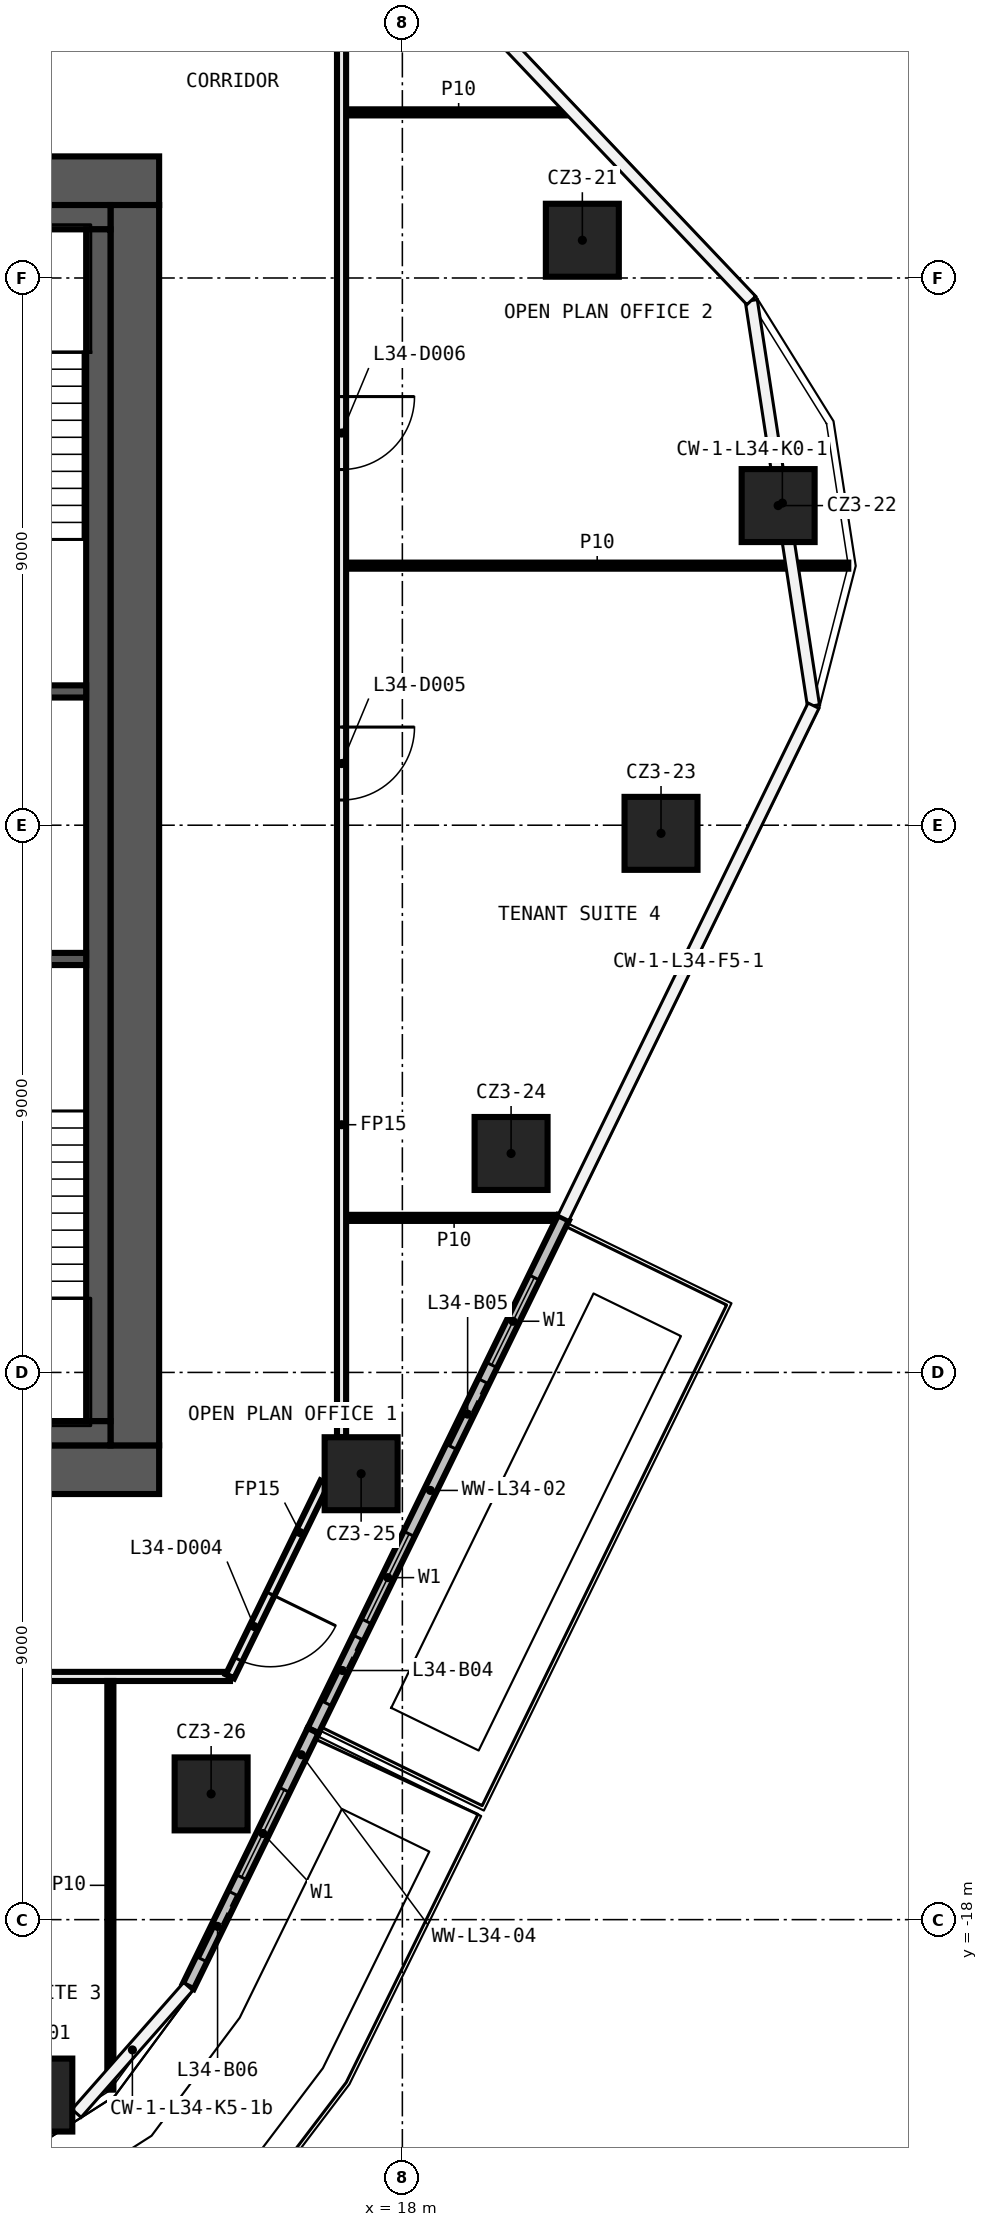
"""IFC4 building model, lengths in metres.
Left out: names, types, materials, properties, quantities, classifications, styles, units other than length and angle.
Written with IfcOpenShell. Run it as: python <this file> out.ifc"""

import sys

from ifc_helpers import new_model, si_unit, direction, frame, frame_2d, origin, origin_2d, place, context, subcontext, project, spatial, rectangle, extrude, element, fill, save


model = new_model("IFC4")
c1 = context("Model", 3, precision=1e-05, world=origin(), true_north=direction((0.0, 1.0)))
c2 = subcontext(c1, "Body", "Model", "MODEL_VIEW")
j1 = project(units=[si_unit("LENGTHUNIT", "METRE"), si_unit("PLANEANGLEUNIT", "RADIAN")], contexts=[c1])
p1 = place(None, origin())
s1 = spatial("IfcSite", under=j1, at=p1, CompositionType="ELEMENT")
p2 = place(p1, origin())
s2 = spatial("IfcBuilding", under=s1, at=p2, CompositionType="ELEMENT")
p3 = place(p2, frame((0.0, 0.0, 158.6)))
s3 = spatial("IfcBuildingStorey", under=s2, at=p3, CompositionType="ELEMENT", Elevation=158.6)
for number, where, z_axis, x_axis in (
    (1, (11.972, -20.885, 0.0), (0.0, 0.0, 1.0), (1.0, 0.0, 0.0)),
    (2, (20.96, 9.621, 0.0), (0.0, 0.0, 1.0), (1.0, 0.0, 0.0)),
    (3, (24.18, 5.257, 0.0), (0.0, 0.0, 1.0), (1.0, 0.0, 0.0)),
    (4, (22.254, -0.134, 0.0), (0.0, 0.0, 1.0), (1.0, 0.0, 0.0)),
    (5, (19.788, -5.399, 0.0), (0.0, 0.0, 1.0), (1.0, 0.0, 0.0)),
    (6, (17.322, -10.666, 0.0), (0.0, 0.0, 1.0), (1.0, 0.0, 0.0)),
    (7, (14.855, -15.932, 0.0), (0.0, 0.0, 1.0), (1.0, 0.0, 0.0)),
):
    element("IfcColumn", number, at=place(p3, frame(where, z_axis=z_axis, x_axis=x_axis)), inside=s3, PredefinedType="COLUMN", context=c2, shape_type="SweptSolid", body=[
        extrude(rectangle(XDim=1.2, YDim=1.2, at=origin_2d()), origin(), (0.0, 0.0, 1.0), 3.82),
    ])
p4 = place(p3, frame((15.165, -14.0, 0.0), z_axis=(0.0, 0.0, 1.0), x_axis=(-1.0, 0.0, 0.0)))
e8 = element("IfcWall", 8, at=p4, inside=s3, PredefinedType="PARTITIONING", context=c2, shape_type="SweptSolid", body=[
    extrude(rectangle(XDim=24.24, YDim=0.15, at=frame_2d((12.12, 0.0))), origin(), (0.0, 0.0, 1.0), 3.82),
])
p5 = place(p4, frame((15.788, 0.0, 0.0)))
e9 = element("IfcOpeningElement", 9, at=p5, cuts=e8, PredefinedType="OPENING", context=c2, shape_type="SweptSolid", body=[
    extrude(rectangle(XDim=1.2, YDim=2.1, at=frame_2d((0.6, 1.05))), frame((0.0, 0.085, 0.0), z_axis=(0.0, -1.0, 0.0), x_axis=(1.0, 0.0, 0.0)), (0.0, 0.0, 1.0), 0.17),
])
p6 = place(p4, frame((7.379, 0.0, 0.0)))
e10 = element("IfcOpeningElement", 10, at=p6, cuts=e8, PredefinedType="OPENING", context=c2, shape_type="SweptSolid", body=[
    extrude(rectangle(XDim=1.2, YDim=2.1, at=frame_2d((0.6, 1.05))), frame((0.0, 0.085, 0.0), z_axis=(0.0, -1.0, 0.0), x_axis=(1.0, 0.0, 0.0)), (0.0, 0.0, 1.0), 0.17),
])
p7 = place(p4, frame((3.323, 0.0, 0.0)))
e11 = element("IfcOpeningElement", 11, at=p7, cuts=e8, PredefinedType="OPENING", context=c2, shape_type="SweptSolid", body=[
    extrude(rectangle(XDim=1.2, YDim=2.1, at=frame_2d((0.6, 1.05))), frame((0.0, 0.085, 0.0), z_axis=(0.0, -1.0, 0.0), x_axis=(1.0, 0.0, 0.0)), (0.0, 0.0, 1.0), 0.17),
])
p8 = place(p3, frame((17.075, -6.458, 0.0), z_axis=(0.0, 0.0, 1.0), x_axis=(1.0, 0.0, 0.0)))
e12 = element("IfcWall", 12, at=p8, inside=s3, PredefinedType="PARTITIONING", context=c2, shape_type="SweptSolid", body=[
    extrude(rectangle(XDim=3.552, YDim=0.1, at=frame_2d((1.776, 0.0))), origin(), (0.0, 0.0, 1.0), 3.82),
])
p9 = place(p3, frame((17.075, 4.269, 0.0), z_axis=(0.0, 0.0, 1.0), x_axis=(1.0, 0.0, 0.0)))
e13 = element("IfcWall", 13, at=p9, inside=s3, PredefinedType="PARTITIONING", context=c2, shape_type="SweptSolid", body=[
    extrude(rectangle(XDim=8.259, YDim=0.1, at=frame_2d((4.129, 0.0))), origin(), (0.0, 0.0, 1.0), 3.82),
])
p10 = place(p3, frame((17.075, 11.724, 0.0), z_axis=(0.0, 0.0, 1.0), x_axis=(1.0, 0.0, 0.0)))
e14 = element("IfcWall", 14, at=p10, inside=s3, PredefinedType="PARTITIONING", context=c2, shape_type="SweptSolid", body=[
    extrude(rectangle(XDim=3.701, YDim=0.1, at=frame_2d((1.851, 0.0))), origin(), (0.0, 0.0, 1.0), 3.82),
])
p11 = place(p3, frame((16.722, -10.809, 0.0), z_axis=(0.0, 0.0, 1.0), x_axis=(-0.438666135365, -0.898650110824, 0.0)))
e15 = element("IfcWall", 15, at=p11, inside=s3, PredefinedType="PARTITIONING", context=c2, shape_type="SweptSolid", body=[
    extrude(rectangle(XDim=3.55, YDim=0.15, at=frame_2d((1.775, 0.0))), origin(), (0.0, 0.0, 1.0), 3.82),
])
p12 = place(p11, frame((2.038, 0.0, 0.0)))
e16 = element("IfcOpeningElement", 16, at=p12, cuts=e15, PredefinedType="OPENING", context=c2, shape_type="SweptSolid", body=[
    extrude(rectangle(XDim=1.2, YDim=2.1, at=frame_2d((0.6, 1.05))), frame((0.0, 0.085, 0.0), z_axis=(0.0, -1.0, 0.0), x_axis=(1.0, 0.0, 0.0)), (0.0, 0.0, 1.0), 0.17),
])
p13 = place(p3, frame((17.0, 13.106, 0.0), z_axis=(0.0, 0.0, 1.0), x_axis=(0.0, -1.0, 0.0)))
e17 = element("IfcWall", 17, at=p13, inside=s3, PredefinedType="PARTITIONING", context=c2, shape_type="SweptSolid", body=[
    extrude(rectangle(XDim=23.172, YDim=0.15, at=frame_2d((11.586, 0.0))), origin(), (0.0, 0.0, 1.0), 3.82),
])
p14 = place(p13, frame((11.492, 0.0, 0.0)))
e18 = element("IfcOpeningElement", 18, at=p14, cuts=e17, PredefinedType="OPENING", context=c2, shape_type="SweptSolid", body=[
    extrude(rectangle(XDim=1.2, YDim=2.1, at=frame_2d((0.6, 1.05))), frame((0.0, 0.085, 0.0), z_axis=(0.0, -1.0, 0.0), x_axis=(1.0, 0.0, 0.0)), (0.0, 0.0, 1.0), 0.17),
])
p15 = place(p13, frame((6.056, 0.0, 0.0)))
e19 = element("IfcOpeningElement", 19, at=p15, cuts=e17, PredefinedType="OPENING", context=c2, shape_type="SweptSolid", body=[
    extrude(rectangle(XDim=1.2, YDim=2.1, at=frame_2d((0.6, 1.05))), frame((0.0, 0.085, 0.0), z_axis=(0.0, -1.0, 0.0), x_axis=(1.0, 0.0, 0.0)), (0.0, 0.0, 1.0), 0.17),
])
p16 = place(p3, frame((13.198, -20.796, 0.0), z_axis=(0.0, 0.0, 1.0), x_axis=(0.0, 1.0, 0.0)))
e20 = element("IfcWall", 20, at=p16, inside=s3, PredefinedType="PARTITIONING", context=c2, shape_type="SweptSolid", body=[
    extrude(rectangle(XDim=6.721, YDim=0.1, at=frame_2d((3.361, 0.0))), origin(), (0.0, 0.0, 1.0), 3.82),
])
p17 = place(p3, frame((16.533, -14.891, 0.0), z_axis=(0.0, 0.0, 1.0), x_axis=(0.438659913387, 0.898653147987, 0.0)))
e21 = element("IfcWall", 21, at=p17, inside=s3, PredefinedType="SOLIDWALL", context=c2, shape_type="SweptSolid", body=[
    extrude(rectangle(XDim=9.384, YDim=0.2, at=frame_2d((4.692, 0.0))), origin(), (0.0, 0.0, 1.0), 3.82),
])
p18 = place(p17, frame((2.0, 0.0, 0.6)))
e22 = element("IfcOpeningElement", 22, at=p18, cuts=e21, PredefinedType="OPENING", context=c2, shape_type="SweptSolid", body=[
    extrude(rectangle(XDim=1.6, YDim=2.4, at=frame_2d((0.8, 1.2))), frame((0.0, 0.11, 0.0), z_axis=(0.0, -1.0, 0.0), x_axis=(1.0, 0.0, 0.0)), (0.0, 0.0, 1.0), 0.22),
])
p19 = place(p17, frame((0.5, 0.0, 0.0)))
e23 = element("IfcOpeningElement", 23, at=p19, cuts=e21, PredefinedType="OPENING", context=c2, shape_type="SweptSolid", body=[
    extrude(rectangle(XDim=1.2, YDim=2.4, at=frame_2d((0.6, 1.2))), frame((0.0, 0.11, 0.0), z_axis=(0.0, -1.0, 0.0), x_axis=(1.0, 0.0, 0.0)), (0.0, 0.0, 1.0), 0.22),
])
p20 = place(p17, frame((6.692, 0.0, 0.6)))
e24 = element("IfcOpeningElement", 24, at=p20, cuts=e21, PredefinedType="OPENING", context=c2, shape_type="SweptSolid", body=[
    extrude(rectangle(XDim=1.6, YDim=2.4, at=frame_2d((0.8, 1.2))), frame((0.0, 0.11, 0.0), z_axis=(0.0, -1.0, 0.0), x_axis=(1.0, 0.0, 0.0)), (0.0, 0.0, 1.0), 0.22),
])
p21 = place(p17, frame((5.192, 0.0, 0.0)))
e25 = element("IfcOpeningElement", 25, at=p21, cuts=e21, PredefinedType="OPENING", context=c2, shape_type="SweptSolid", body=[
    extrude(rectangle(XDim=1.2, YDim=2.4, at=frame_2d((0.6, 1.2))), frame((0.0, 0.11, 0.0), z_axis=(0.0, -1.0, 0.0), x_axis=(1.0, 0.0, 0.0)), (0.0, 0.0, 1.0), 0.22),
])
p22 = place(p3, frame((14.479, -19.099, 0.0), z_axis=(0.0, 0.0, 1.0), x_axis=(0.438663973521, 0.898651166101, 0.0)))
e26 = element("IfcWall", 26, at=p22, inside=s3, PredefinedType="SOLIDWALL", context=c2, shape_type="SweptSolid", body=[
    extrude(rectangle(XDim=4.683, YDim=0.2, at=frame_2d((2.341, 0.0))), origin(), (0.0, 0.0, 1.0), 3.82),
])
p23 = place(p22, frame((2.0, 0.0, 0.6)))
e27 = element("IfcOpeningElement", 27, at=p23, cuts=e26, PredefinedType="OPENING", context=c2, shape_type="SweptSolid", body=[
    extrude(rectangle(XDim=1.6, YDim=2.4, at=frame_2d((0.8, 1.2))), frame((0.0, 0.11, 0.0), z_axis=(0.0, -1.0, 0.0), x_axis=(1.0, 0.0, 0.0)), (0.0, 0.0, 1.0), 0.22),
])
p24 = place(p22, frame((0.5, 0.0, 0.0)))
e28 = element("IfcOpeningElement", 28, at=p24, cuts=e26, PredefinedType="OPENING", context=c2, shape_type="SweptSolid", body=[
    extrude(rectangle(XDim=1.2, YDim=2.4, at=frame_2d((0.6, 1.2))), frame((0.0, 0.11, 0.0), z_axis=(0.0, -1.0, 0.0), x_axis=(1.0, 0.0, 0.0)), (0.0, 0.0, 1.0), 0.22),
])
p25 = place(p3, frame((-14.0, 10.6, 0.0), z_axis=(0.0, 0.0, 1.0), x_axis=(1.0, 0.0, 0.0)))
e29 = element("IfcWall", 29, at=p25, inside=s3, PredefinedType="SHEAR", context=c2, shape_type="SweptSolid", body=[
    extrude(rectangle(XDim=28.0, YDim=0.8, at=frame_2d((14.0, 0.0))), origin(), (0.0, 0.0, 1.0), 3.82),
])
p26 = place(p25, frame((15.9, 0.0, 0.0)))
e30 = element("IfcOpeningElement", 30, at=p26, cuts=e29, PredefinedType="OPENING", context=c2, shape_type="SweptSolid", body=[
    extrude(rectangle(XDim=1.6, YDim=2.1, at=frame_2d((0.8, 1.05))), frame((0.0, 0.41, 0.0), z_axis=(0.0, -1.0, 0.0), x_axis=(1.0, 0.0, 0.0)), (0.0, 0.0, 1.0), 0.82),
])
p27 = place(p3, frame((14.0, -10.6, 0.0), z_axis=(0.0, 0.0, 1.0), x_axis=(-1.0, 0.0, 0.0)))
e31 = element("IfcWall", 31, at=p27, inside=s3, PredefinedType="SHEAR", context=c2, shape_type="SweptSolid", body=[
    extrude(rectangle(XDim=28.0, YDim=0.8, at=frame_2d((14.0, 0.0))), origin(), (0.0, 0.0, 1.0), 3.82),
])
p28 = place(p27, frame((5.1, 0.0, 0.0)))
e32 = element("IfcOpeningElement", 32, at=p28, cuts=e31, PredefinedType="OPENING", context=c2, shape_type="SweptSolid", body=[
    extrude(rectangle(XDim=1.6, YDim=2.1, at=frame_2d((0.8, 1.05))), frame((0.0, 0.41, 0.0), z_axis=(0.0, -1.0, 0.0), x_axis=(1.0, 0.0, 0.0)), (0.0, 0.0, 1.0), 0.82),
])
p29 = place(p3, frame((13.6, 10.2, 0.0), z_axis=(0.0, 0.0, 1.0), x_axis=(0.0, -1.0, 0.0)))
e33 = element("IfcWall", 33, at=p29, inside=s3, PredefinedType="SHEAR", context=c2, shape_type="SweptSolid", body=[
    extrude(rectangle(XDim=20.4, YDim=0.8, at=frame_2d((10.2, 0.0))), origin(), (0.0, 0.0, 1.0), 3.82),
])
p30 = place(p3, frame((3.9, 10.0, 0.0), z_axis=(0.0, 0.0, 1.0), x_axis=(1.0, 0.0, 0.0)))
e34 = element("IfcWall", 34, at=p30, inside=s3, PredefinedType="SHEAR", context=c2, shape_type="SweptSolid", body=[
    extrude(rectangle(XDim=9.3, YDim=0.4, at=frame_2d((4.65, 0.0))), origin(), (0.0, 0.0, 1.0), 3.82),
])
p31 = place(p3, frame((13.2, -10.0, 0.0), z_axis=(0.0, 0.0, 1.0), x_axis=(-1.0, 0.0, 0.0)))
e35 = element("IfcWall", 35, at=p31, inside=s3, PredefinedType="SHEAR", context=c2, shape_type="SweptSolid", body=[
    extrude(rectangle(XDim=3.9, YDim=0.4, at=frame_2d((1.95, 0.0))), origin(), (0.0, 0.0, 1.0), 3.82),
])
p32 = place(p3, frame((13.0, 9.8, 0.0), z_axis=(0.0, 0.0, 1.0), x_axis=(0.0, -1.0, 0.0)))
e36 = element("IfcWall", 36, at=p32, inside=s3, PredefinedType="SHEAR", context=c2, shape_type="SweptSolid", body=[
    extrude(rectangle(XDim=19.6, YDim=0.4, at=frame_2d((9.8, 0.0))), origin(), (0.0, 0.0, 1.0), 3.82),
])
for number, where, z_axis, x_axis in (
    (37, (9.45, 2.2, 0.0), (0.0, 0.0, 1.0), (1.0, 0.0, 0.0)),
    (38, (9.45, -2.2, 0.0), (0.0, 0.0, 1.0), (1.0, 0.0, 0.0)),
):
    element("IfcWall", number, at=place(p3, frame(where, z_axis=z_axis, x_axis=x_axis)), inside=s3, PredefinedType="SHEAR", context=c2, shape_type="SweptSolid", body=[
        extrude(rectangle(XDim=3.35, YDim=0.2, at=frame_2d((1.675, 0.0))), origin(), (0.0, 0.0, 1.0), 3.82),
    ])
p33 = place(p12, origin())
e39 = element("IfcDoor", 39, at=p33, inside=s3, OperationType="SINGLE_SWING_LEFT", PredefinedType="DOOR", context=c2, shape_type="SweptSolid", body=[
    extrude(rectangle(XDim=1.2, YDim=2.1, at=frame_2d((0.6, 1.05))), frame((0.0, 0.025, 0.0), z_axis=(0.0, -1.0, 0.0), x_axis=(1.0, 0.0, 0.0)), (0.0, 0.0, 1.0), 0.05),
])
fill(e16, e39)
p34 = place(p14, origin())
e40 = element("IfcDoor", 40, at=p34, inside=s3, OperationType="SINGLE_SWING_RIGHT", PredefinedType="DOOR", context=c2, shape_type="SweptSolid", body=[
    extrude(rectangle(XDim=1.2, YDim=2.1, at=frame_2d((0.6, 1.05))), frame((0.0, 0.025, 0.0), z_axis=(0.0, -1.0, 0.0), x_axis=(1.0, 0.0, 0.0)), (0.0, 0.0, 1.0), 0.05),
])
fill(e18, e40)
p35 = place(p15, origin())
e41 = element("IfcDoor", 41, at=p35, inside=s3, OperationType="SINGLE_SWING_LEFT", PredefinedType="DOOR", context=c2, shape_type="SweptSolid", body=[
    extrude(rectangle(XDim=1.2, YDim=2.1, at=frame_2d((0.6, 1.05))), frame((0.0, 0.025, 0.0), z_axis=(0.0, -1.0, 0.0), x_axis=(1.0, 0.0, 0.0)), (0.0, 0.0, 1.0), 0.05),
])
fill(e19, e41)
p36 = place(p18, origin())
e42 = element("IfcWindow", 42, at=p36, inside=s3, PartitioningType="SINGLE_PANEL", PredefinedType="WINDOW", context=c2, shape_type="SweptSolid", body=[
    extrude(rectangle(XDim=1.6, YDim=2.4, at=frame_2d((0.8, 1.2))), frame((0.0, 0.03, 0.0), z_axis=(0.0, -1.0, 0.0), x_axis=(1.0, 0.0, 0.0)), (0.0, 0.0, 1.0), 0.06),
])
fill(e22, e42)
p37 = place(p19, origin())
e43 = element("IfcDoor", 43, at=p37, inside=s3, OperationType="SLIDING_TO_LEFT", PredefinedType="DOOR", context=c2, shape_type="SweptSolid", body=[
    extrude(rectangle(XDim=1.2, YDim=2.4, at=frame_2d((0.6, 1.2))), frame((0.0, 0.025, 0.0), z_axis=(0.0, -1.0, 0.0), x_axis=(1.0, 0.0, 0.0)), (0.0, 0.0, 1.0), 0.05),
])
fill(e23, e43)
p38 = place(p20, origin())
e44 = element("IfcWindow", 44, at=p38, inside=s3, PartitioningType="SINGLE_PANEL", PredefinedType="WINDOW", context=c2, shape_type="SweptSolid", body=[
    extrude(rectangle(XDim=1.6, YDim=2.4, at=frame_2d((0.8, 1.2))), frame((0.0, 0.03, 0.0), z_axis=(0.0, -1.0, 0.0), x_axis=(1.0, 0.0, 0.0)), (0.0, 0.0, 1.0), 0.06),
])
fill(e24, e44)
p39 = place(p21, origin())
e45 = element("IfcDoor", 45, at=p39, inside=s3, OperationType="SLIDING_TO_LEFT", PredefinedType="DOOR", context=c2, shape_type="SweptSolid", body=[
    extrude(rectangle(XDim=1.2, YDim=2.4, at=frame_2d((0.6, 1.2))), frame((0.0, 0.025, 0.0), z_axis=(0.0, -1.0, 0.0), x_axis=(1.0, 0.0, 0.0)), (0.0, 0.0, 1.0), 0.05),
])
fill(e25, e45)
p40 = place(p23, origin())
e46 = element("IfcWindow", 46, at=p40, inside=s3, PartitioningType="SINGLE_PANEL", PredefinedType="WINDOW", context=c2, shape_type="SweptSolid", body=[
    extrude(rectangle(XDim=1.6, YDim=2.4, at=frame_2d((0.8, 1.2))), frame((0.0, 0.03, 0.0), z_axis=(0.0, -1.0, 0.0), x_axis=(1.0, 0.0, 0.0)), (0.0, 0.0, 1.0), 0.06),
])
fill(e27, e46)
p41 = place(p24, origin())
e47 = element("IfcDoor", 47, at=p41, inside=s3, OperationType="SLIDING_TO_LEFT", PredefinedType="DOOR", context=c2, shape_type="SweptSolid", body=[
    extrude(rectangle(XDim=1.2, YDim=2.4, at=frame_2d((0.6, 1.2))), frame((0.0, 0.025, 0.0), z_axis=(0.0, -1.0, 0.0), x_axis=(1.0, 0.0, 0.0)), (0.0, 0.0, 1.0), 0.05),
])
fill(e28, e47)
save(model, sys.argv[1])
